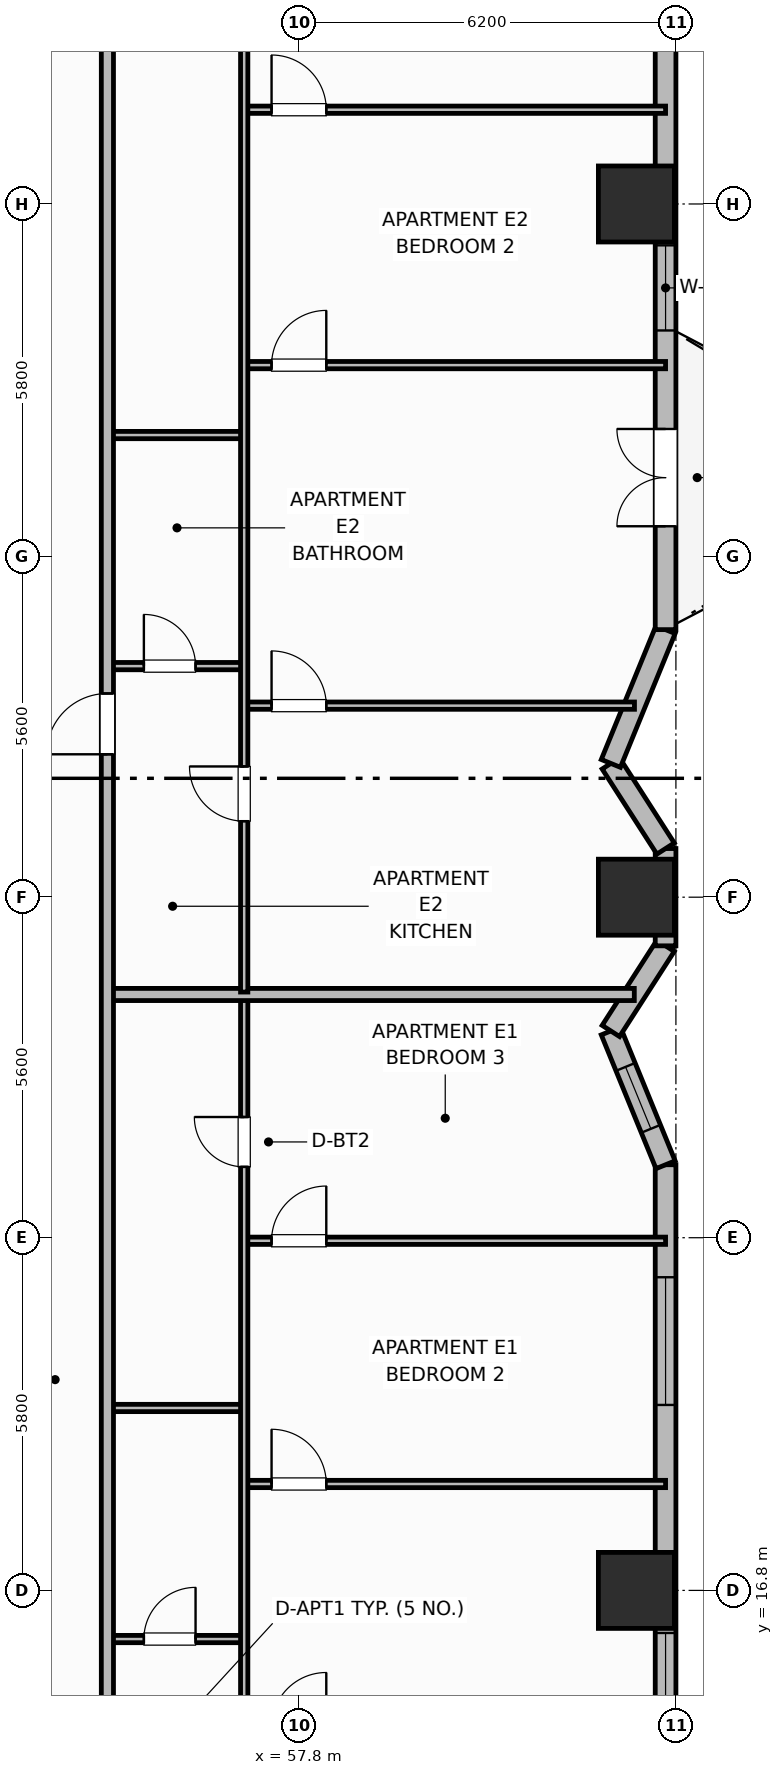
"""IFC4 building model, lengths in metres.
Left out: names, types, materials, properties, quantities, classifications, styles, units other than length and angle.
Written with IfcOpenShell. Run it as: python <this file> out.ifc"""

import sys

from ifc_helpers import new_model, si_unit, direction, frame, frame_2d, origin, origin_2d, place, context, subcontext, project, spatial, rectangle, extrude, element, fill, save


model = new_model("IFC4")
c1 = context("Model", 3, precision=1e-05, world=origin(), true_north=direction((0.0, 1.0)))
c2 = subcontext(c1, "Body", "Model", "MODEL_VIEW")
j1 = project(units=[si_unit("LENGTHUNIT", "METRE"), si_unit("PLANEANGLEUNIT", "RADIAN")], contexts=[c1])
p1 = place(None, origin())
s1 = spatial("IfcSite", under=j1, at=p1, CompositionType="ELEMENT")
p2 = place(p1, origin())
s2 = spatial("IfcBuilding", under=s1, at=p2, CompositionType="ELEMENT")
p3 = place(p2, frame((0.0, 0.0, 36.2)))
s3 = spatial("IfcBuildingStorey", under=s2, at=p3, CompositionType="ELEMENT", Elevation=36.2)
for number, where, z_axis, x_axis in (
    (1, (63.35, 16.8, 0.0), (0.0, 0.0, 1.0), (1.0, 0.0, 0.0)),
    (2, (63.35, 28.2, 0.0), (0.0, 0.0, 1.0), (1.0, 0.0, 0.0)),
    (3, (63.35, 39.6, 0.0), (0.0, 0.0, 1.0), (1.0, 0.0, 0.0)),
):
    element("IfcColumn", number, at=place(p3, frame(where, z_axis=z_axis, x_axis=x_axis)), inside=s3, PredefinedType="COLUMN", context=c2, shape_type="SweptSolid", body=[
        extrude(rectangle(XDim=1.25, YDim=1.25, at=origin_2d()), origin(), (0.0, 0.0, 1.0), 3.7),
    ])
p4 = place(p3, frame((63.83, 9.0, 0.0), z_axis=(0.0, 0.0, 1.0), x_axis=(0.0, 1.0, 0.0)))
e4 = element("IfcWall", 4, at=p4, inside=s3, PredefinedType="SOLIDWALL", context=c2, shape_type="SweptSolid", body=[
    extrude(rectangle(XDim=14.8, YDim=0.34, at=frame_2d((7.4, 0.0))), origin(), (0.0, 0.0, 1.0), 2.7),
])
p5 = place(p4, frame((2.9, 0.0, 0.68)))
e5 = element("IfcOpeningElement", 5, at=p5, cuts=e4, PredefinedType="OPENING", context=c2, shape_type="SweptSolid", body=[
    extrude(rectangle(XDim=2.1, YDim=1.9, at=frame_2d((1.05, 0.95))), frame((0.0, 0.18, 0.0), z_axis=(0.0, -1.0, 0.0), x_axis=(1.0, 0.0, 0.0)), (0.0, 0.0, 1.0), 0.36),
])
p6 = place(p4, frame((6.0, 0.0, 0.89)))
e6 = element("IfcOpeningElement", 6, at=p6, cuts=e4, PredefinedType="OPENING", context=c2, shape_type="SweptSolid", body=[
    extrude(rectangle(XDim=1.1, YDim=1.65, at=frame_2d((0.55, 0.825))), frame((0.0, 0.18, 0.0), z_axis=(0.0, -1.0, 0.0), x_axis=(1.0, 0.0, 0.0)), (0.0, 0.0, 1.0), 0.36),
])
p7 = place(p4, frame((10.85, 0.0, 0.68)))
e7 = element("IfcOpeningElement", 7, at=p7, cuts=e4, PredefinedType="OPENING", context=c2, shape_type="SweptSolid", body=[
    extrude(rectangle(XDim=2.1, YDim=1.9, at=frame_2d((1.05, 0.95))), frame((0.0, 0.18, 0.0), z_axis=(0.0, -1.0, 0.0), x_axis=(1.0, 0.0, 0.0)), (0.0, 0.0, 1.0), 0.36),
])
p8 = place(p3, frame((63.83, 23.8, 0.0), z_axis=(0.0, 0.0, 1.0), x_axis=(-0.378692835005, 0.925522412865, 0.0)))
e8 = element("IfcWall", 8, at=p8, inside=s3, PredefinedType="SOLIDWALL", context=c2, shape_type="SweptSolid", body=[
    extrude(rectangle(XDim=2.377, YDim=0.34, at=frame_2d((1.188, 0.0))), origin(), (0.0, 0.0, 1.0), 2.7),
])
p9 = place(p8, frame((0.638, 0.0, 0.89)))
e9 = element("IfcOpeningElement", 9, at=p9, cuts=e8, PredefinedType="OPENING", context=c2, shape_type="SweptSolid", body=[
    extrude(rectangle(XDim=1.1, YDim=1.65, at=frame_2d((0.55, 0.825))), frame((0.0, 0.18, 0.0), z_axis=(0.0, -1.0, 0.0), x_axis=(1.0, 0.0, 0.0)), (0.0, 0.0, 1.0), 0.36),
])
p10 = place(p3, frame((62.93, 26.0, 0.0), z_axis=(0.0, 0.0, 1.0), x_axis=(0.540846555596, 0.841121277403, 0.0)))
e10 = element("IfcWall", 10, at=p10, inside=s3, PredefinedType="SOLIDWALL", context=c2, shape_type="SweptSolid", body=[
    extrude(rectangle(XDim=1.664, YDim=0.34, at=frame_2d((0.832, 0.0))), origin(), (0.0, 0.0, 1.0), 2.7),
])
p11 = place(p3, frame((63.83, 27.4, 0.0), z_axis=(0.0, 0.0, 1.0), x_axis=(0.0, 1.0, 0.0)))
e11 = element("IfcWall", 11, at=p11, inside=s3, PredefinedType="SOLIDWALL", context=c2, shape_type="SweptSolid", body=[
    extrude(rectangle(XDim=1.6, YDim=0.34, at=frame_2d((0.8, 0.0))), origin(), (0.0, 0.0, 1.0), 2.7),
])
p12 = place(p3, frame((63.83, 29.0, 0.0), z_axis=(0.0, 0.0, 1.0), x_axis=(-0.540846555596, 0.841121277403, 0.0)))
e12 = element("IfcWall", 12, at=p12, inside=s3, PredefinedType="SOLIDWALL", context=c2, shape_type="SweptSolid", body=[
    extrude(rectangle(XDim=1.664, YDim=0.34, at=frame_2d((0.832, 0.0))), origin(), (0.0, 0.0, 1.0), 2.7),
])
p13 = place(p3, frame((62.93, 30.4, 0.0), z_axis=(0.0, 0.0, 1.0), x_axis=(0.378656839344, 0.925537140269, 0.0)))
e13 = element("IfcWall", 13, at=p13, inside=s3, PredefinedType="SOLIDWALL", context=c2, shape_type="SweptSolid", body=[
    extrude(rectangle(XDim=2.377, YDim=0.34, at=frame_2d((1.188, 0.0))), origin(), (0.0, 0.0, 1.0), 2.7),
])
p14 = place(p3, frame((63.83, 32.6, 0.0), z_axis=(0.0, 0.0, 1.0), x_axis=(0.0, 1.0, 0.0)))
e14 = element("IfcWall", 14, at=p14, inside=s3, PredefinedType="SOLIDWALL", context=c2, shape_type="SweptSolid", body=[
    extrude(rectangle(XDim=14.8, YDim=0.34, at=frame_2d((7.4, 0.0))), origin(), (0.0, 0.0, 1.0), 2.7),
])
p15 = place(p14, frame((1.7, 0.0, 0.0)))
e15 = element("IfcOpeningElement", 15, at=p15, cuts=e14, PredefinedType="OPENING", context=c2, shape_type="SweptSolid", body=[
    extrude(rectangle(XDim=1.6, YDim=2.1, at=frame_2d((0.8, 1.05))), frame((0.0, 0.18, 0.0), z_axis=(0.0, -1.0, 0.0), x_axis=(1.0, 0.0, 0.0)), (0.0, 0.0, 1.0), 0.36),
])
p16 = place(p14, frame((4.92, 0.0, 0.69)))
e16 = element("IfcOpeningElement", 16, at=p16, cuts=e14, PredefinedType="OPENING", context=c2, shape_type="SweptSolid", body=[
    extrude(rectangle(XDim=1.4, YDim=1.85, at=frame_2d((0.7, 0.925))), frame((0.0, 0.18, 0.0), z_axis=(0.0, -1.0, 0.0), x_axis=(1.0, 0.0, 0.0)), (0.0, 0.0, 1.0), 0.36),
])
p17 = place(p14, frame((9.95, 0.0, 0.73)))
e17 = element("IfcOpeningElement", 17, at=p17, cuts=e14, PredefinedType="OPENING", context=c2, shape_type="SweptSolid", body=[
    extrude(rectangle(XDim=1.8, YDim=1.85, at=frame_2d((0.9, 0.925))), frame((0.0, 0.18, 0.0), z_axis=(0.0, -1.0, 0.0), x_axis=(1.0, 0.0, 0.0)), (0.0, 0.0, 1.0), 0.36),
])
p18 = place(p3, frame((54.65, 16.0, 0.0), z_axis=(0.0, 0.0, 1.0), x_axis=(1.0, 0.0, 0.0)))
e18 = element("IfcWall", 18, at=p18, inside=s3, PredefinedType="PARTITIONING", context=c2, shape_type="SweptSolid", body=[
    extrude(rectangle(XDim=2.25, YDim=0.12, at=frame_2d((1.125, 0.0))), origin(), (0.0, 0.0, 1.0), 2.53),
])
p19 = place(p18, frame((0.6, 0.0, 0.0)))
e19 = element("IfcOpeningElement", 19, at=p19, cuts=e18, PredefinedType="OPENING", context=c2, shape_type="SweptSolid", body=[
    extrude(rectangle(XDim=0.85, YDim=2.1, at=frame_2d((0.425, 1.05))), frame((0.0, 0.07, 0.0), z_axis=(0.0, -1.0, 0.0), x_axis=(1.0, 0.0, 0.0)), (0.0, 0.0, 1.0), 0.14),
])
p20 = place(p3, frame((54.65, 19.8, 0.0), z_axis=(0.0, 0.0, 1.0), x_axis=(1.0, 0.0, 0.0)))
e20 = element("IfcWall", 20, at=p20, inside=s3, PredefinedType="PARTITIONING", context=c2, shape_type="SweptSolid", body=[
    extrude(rectangle(XDim=2.25, YDim=0.12, at=frame_2d((1.125, 0.0))), origin(), (0.0, 0.0, 1.0), 2.53),
])
p21 = place(p3, frame((56.9, 18.55, 0.0), z_axis=(0.0, 0.0, 1.0), x_axis=(1.0, 0.0, 0.0)))
e21 = element("IfcWall", 21, at=p21, inside=s3, PredefinedType="PARTITIONING", context=c2, shape_type="SweptSolid", body=[
    extrude(rectangle(XDim=6.93, YDim=0.12, at=frame_2d((3.465, 0.0))), origin(), (0.0, 0.0, 1.0), 2.53),
])
p22 = place(p21, frame((0.45, 0.0, 0.0)))
e22 = element("IfcOpeningElement", 22, at=p22, cuts=e21, PredefinedType="OPENING", context=c2, shape_type="SweptSolid", body=[
    extrude(rectangle(XDim=0.9, YDim=2.1, at=frame_2d((0.45, 1.05))), frame((0.0, 0.07, 0.0), z_axis=(0.0, -1.0, 0.0), x_axis=(1.0, 0.0, 0.0)), (0.0, 0.0, 1.0), 0.14),
])
p23 = place(p3, frame((56.9, 22.55, 0.0), z_axis=(0.0, 0.0, 1.0), x_axis=(1.0, 0.0, 0.0)))
e23 = element("IfcWall", 23, at=p23, inside=s3, PredefinedType="PARTITIONING", context=c2, shape_type="SweptSolid", body=[
    extrude(rectangle(XDim=6.93, YDim=0.12, at=frame_2d((3.465, 0.0))), origin(), (0.0, 0.0, 1.0), 2.53),
])
p24 = place(p23, frame((0.45, 0.0, 0.0)))
e24 = element("IfcOpeningElement", 24, at=p24, cuts=e23, PredefinedType="OPENING", context=c2, shape_type="SweptSolid", body=[
    extrude(rectangle(XDim=0.9, YDim=2.1, at=frame_2d((0.45, 1.05))), frame((0.0, 0.07, 0.0), z_axis=(0.0, -1.0, 0.0), x_axis=(1.0, 0.0, 0.0)), (0.0, 0.0, 1.0), 0.14),
])
p25 = place(p3, frame((56.9, 10.64, 0.0), z_axis=(0.0, 0.0, 1.0), x_axis=(0.0, 1.0, 0.0)))
e25 = element("IfcWall", 25, at=p25, inside=s3, PredefinedType="PARTITIONING", context=c2, shape_type="SweptSolid", body=[
    extrude(rectangle(XDim=15.92, YDim=0.12, at=frame_2d((7.96, 0.0))), origin(), (0.0, 0.0, 1.0), 2.53),
])
p26 = place(p25, frame((0.41, 0.0, 0.0)))
e26 = element("IfcOpeningElement", 26, at=p26, cuts=e25, PredefinedType="OPENING", context=c2, shape_type="SweptSolid", body=[
    extrude(rectangle(XDim=0.9, YDim=2.1, at=frame_2d((0.45, 1.05))), frame((0.0, 0.07, 0.0), z_axis=(0.0, -1.0, 0.0), x_axis=(1.0, 0.0, 0.0)), (0.0, 0.0, 1.0), 0.14),
])
p27 = place(p25, frame((13.125, 0.0, 0.0)))
e27 = element("IfcOpeningElement", 27, at=p27, cuts=e25, PredefinedType="OPENING", context=c2, shape_type="SweptSolid", body=[
    extrude(rectangle(XDim=0.82, YDim=2.08, at=frame_2d((0.41, 1.04))), frame((0.0, 0.07, 0.0), z_axis=(0.0, -1.0, 0.0), x_axis=(1.0, 0.0, 0.0)), (0.0, 0.0, 1.0), 0.14),
])
p28 = place(p3, frame((54.65, 26.6, 0.0), z_axis=(0.0, 0.0, 1.0), x_axis=(1.0, 0.0, 0.0)))
e28 = element("IfcWall", 28, at=p28, inside=s3, PredefinedType="PARTITIONING", context=c2, shape_type="SweptSolid", body=[
    extrude(rectangle(XDim=8.666, YDim=0.2, at=frame_2d((4.333, 0.0))), origin(), (0.0, 0.0, 1.0), 2.53),
])
p29 = place(p3, frame((54.65, 32.0, 0.0), z_axis=(0.0, 0.0, 1.0), x_axis=(1.0, 0.0, 0.0)))
e29 = element("IfcWall", 29, at=p29, inside=s3, PredefinedType="PARTITIONING", context=c2, shape_type="SweptSolid", body=[
    extrude(rectangle(XDim=2.25, YDim=0.12, at=frame_2d((1.125, 0.0))), origin(), (0.0, 0.0, 1.0), 2.53),
])
p30 = place(p29, frame((0.6, 0.0, 0.0)))
e30 = element("IfcOpeningElement", 30, at=p30, cuts=e29, PredefinedType="OPENING", context=c2, shape_type="SweptSolid", body=[
    extrude(rectangle(XDim=0.85, YDim=2.1, at=frame_2d((0.425, 1.05))), frame((0.0, 0.07, 0.0), z_axis=(0.0, -1.0, 0.0), x_axis=(1.0, 0.0, 0.0)), (0.0, 0.0, 1.0), 0.14),
])
p31 = place(p3, frame((54.65, 35.8, 0.0), z_axis=(0.0, 0.0, 1.0), x_axis=(1.0, 0.0, 0.0)))
e31 = element("IfcWall", 31, at=p31, inside=s3, PredefinedType="PARTITIONING", context=c2, shape_type="SweptSolid", body=[
    extrude(rectangle(XDim=2.25, YDim=0.12, at=frame_2d((1.125, 0.0))), origin(), (0.0, 0.0, 1.0), 2.53),
])
p32 = place(p3, frame((56.9, 31.35, 0.0), z_axis=(0.0, 0.0, 1.0), x_axis=(1.0, 0.0, 0.0)))
e32 = element("IfcWall", 32, at=p32, inside=s3, PredefinedType="PARTITIONING", context=c2, shape_type="SweptSolid", body=[
    extrude(rectangle(XDim=6.419, YDim=0.12, at=frame_2d((3.209, 0.0))), origin(), (0.0, 0.0, 1.0), 2.53),
])
p33 = place(p32, frame((0.45, 0.0, 0.0)))
e33 = element("IfcOpeningElement", 33, at=p33, cuts=e32, PredefinedType="OPENING", context=c2, shape_type="SweptSolid", body=[
    extrude(rectangle(XDim=0.9, YDim=2.1, at=frame_2d((0.45, 1.05))), frame((0.0, 0.07, 0.0), z_axis=(0.0, -1.0, 0.0), x_axis=(1.0, 0.0, 0.0)), (0.0, 0.0, 1.0), 0.14),
])
p34 = place(p3, frame((56.9, 36.95, 0.0), z_axis=(0.0, 0.0, 1.0), x_axis=(1.0, 0.0, 0.0)))
e34 = element("IfcWall", 34, at=p34, inside=s3, PredefinedType="PARTITIONING", context=c2, shape_type="SweptSolid", body=[
    extrude(rectangle(XDim=6.93, YDim=0.12, at=frame_2d((3.465, 0.0))), origin(), (0.0, 0.0, 1.0), 2.53),
])
p35 = place(p34, frame((0.45, 0.0, 0.0)))
e35 = element("IfcOpeningElement", 35, at=p35, cuts=e34, PredefinedType="OPENING", context=c2, shape_type="SweptSolid", body=[
    extrude(rectangle(XDim=0.9, YDim=2.1, at=frame_2d((0.45, 1.05))), frame((0.0, 0.07, 0.0), z_axis=(0.0, -1.0, 0.0), x_axis=(1.0, 0.0, 0.0)), (0.0, 0.0, 1.0), 0.14),
])
p36 = place(p3, frame((56.9, 41.15, 0.0), z_axis=(0.0, 0.0, 1.0), x_axis=(1.0, 0.0, 0.0)))
e36 = element("IfcWall", 36, at=p36, inside=s3, PredefinedType="PARTITIONING", context=c2, shape_type="SweptSolid", body=[
    extrude(rectangle(XDim=6.93, YDim=0.12, at=frame_2d((3.465, 0.0))), origin(), (0.0, 0.0, 1.0), 2.53),
])
p37 = place(p36, frame((0.45, 0.0, 0.0)))
e37 = element("IfcOpeningElement", 37, at=p37, cuts=e36, PredefinedType="OPENING", context=c2, shape_type="SweptSolid", body=[
    extrude(rectangle(XDim=0.9, YDim=2.1, at=frame_2d((0.45, 1.05))), frame((0.0, 0.07, 0.0), z_axis=(0.0, -1.0, 0.0), x_axis=(1.0, 0.0, 0.0)), (0.0, 0.0, 1.0), 0.14),
])
p38 = place(p3, frame((56.9, 26.64, 0.0), z_axis=(0.0, 0.0, 1.0), x_axis=(0.0, 1.0, 0.0)))
e38 = element("IfcWall", 38, at=p38, inside=s3, PredefinedType="PARTITIONING", context=c2, shape_type="SweptSolid", body=[
    extrude(rectangle(XDim=19.12, YDim=0.12, at=frame_2d((9.56, 0.0))), origin(), (0.0, 0.0, 1.0), 2.53),
])
p39 = place(p38, frame((2.81, 0.0, 0.0)))
e39 = element("IfcOpeningElement", 39, at=p39, cuts=e38, PredefinedType="OPENING", context=c2, shape_type="SweptSolid", body=[
    extrude(rectangle(XDim=0.9, YDim=2.1, at=frame_2d((0.45, 1.05))), frame((0.0, 0.07, 0.0), z_axis=(0.0, -1.0, 0.0), x_axis=(1.0, 0.0, 0.0)), (0.0, 0.0, 1.0), 0.14),
])
p40 = place(p38, frame((16.18, 0.0, 0.0)))
e40 = element("IfcOpeningElement", 40, at=p40, cuts=e38, PredefinedType="OPENING", context=c2, shape_type="SweptSolid", body=[
    extrude(rectangle(XDim=0.82, YDim=2.08, at=frame_2d((0.41, 1.04))), frame((0.0, 0.07, 0.0), z_axis=(0.0, -1.0, 0.0), x_axis=(1.0, 0.0, 0.0)), (0.0, 0.0, 1.0), 0.14),
])
p41 = place(p3, frame((54.65, 10.6, 0.0), z_axis=(0.0, 0.0, 1.0), x_axis=(0.0, 1.0, 0.0)))
e41 = element("IfcWall", 41, at=p41, inside=s3, PredefinedType="PARTITIONING", context=c2, shape_type="SweptSolid", body=[
    extrude(rectangle(XDim=35.2, YDim=0.2, at=frame_2d((17.6, 0.0))), origin(), (0.0, 0.0, 1.0), 2.53),
])
p42 = place(p41, frame((2.65, 0.0, 0.0)))
e42 = element("IfcOpeningElement", 42, at=p42, cuts=e41, PredefinedType="OPENING", context=c2, shape_type="SweptSolid", body=[
    extrude(rectangle(XDim=1.0, YDim=2.15, at=frame_2d((0.5, 1.075))), frame((0.0, 0.11, 0.0), z_axis=(0.0, -1.0, 0.0), x_axis=(1.0, 0.0, 0.0)), (0.0, 0.0, 1.0), 0.22),
])
p43 = place(p41, frame((19.95, 0.0, 0.0)))
e43 = element("IfcOpeningElement", 43, at=p43, cuts=e41, PredefinedType="OPENING", context=c2, shape_type="SweptSolid", body=[
    extrude(rectangle(XDim=1.0, YDim=2.15, at=frame_2d((0.5, 1.075))), frame((0.0, 0.11, 0.0), z_axis=(0.0, -1.0, 0.0), x_axis=(1.0, 0.0, 0.0)), (0.0, 0.0, 1.0), 0.22),
])
p44 = place(p6, origin())
e44 = element("IfcWindow", 44, at=p44, inside=s3, PartitioningType="SINGLE_PANEL", PredefinedType="WINDOW", context=c2, shape_type="SweptSolid", body=[
    extrude(rectangle(XDim=1.1, YDim=1.65, at=frame_2d((0.55, 0.825))), frame((0.0, 0.03, 0.0), z_axis=(0.0, -1.0, 0.0), x_axis=(1.0, 0.0, 0.0)), (0.0, 0.0, 1.0), 0.06),
])
fill(e6, e44)
p45 = place(p7, origin())
e45 = element("IfcWindow", 45, at=p45, inside=s3, PartitioningType="SINGLE_PANEL", PredefinedType="WINDOW", context=c2, shape_type="SweptSolid", body=[
    extrude(rectangle(XDim=2.1, YDim=1.9, at=frame_2d((1.05, 0.95))), frame((0.0, 0.03, 0.0), z_axis=(0.0, -1.0, 0.0), x_axis=(1.0, 0.0, 0.0)), (0.0, 0.0, 1.0), 0.06),
])
fill(e7, e45)
p46 = place(p9, origin())
e46 = element("IfcWindow", 46, at=p46, inside=s3, PartitioningType="SINGLE_PANEL", PredefinedType="WINDOW", context=c2, shape_type="SweptSolid", body=[
    extrude(rectangle(XDim=1.1, YDim=1.65, at=frame_2d((0.55, 0.825))), frame((0.0, 0.03, 0.0), z_axis=(0.0, -1.0, 0.0), x_axis=(1.0, 0.0, 0.0)), (0.0, 0.0, 1.0), 0.06),
])
fill(e9, e46)
p47 = place(p15, origin())
e47 = element("IfcDoor", 47, at=p47, inside=s3, OperationType="DOUBLE_DOOR_SINGLE_SWING", PredefinedType="DOOR", context=c2, shape_type="SweptSolid", body=[
    extrude(rectangle(XDim=1.6, YDim=2.1, at=frame_2d((0.8, 1.05))), frame((0.0, 0.025, 0.0), z_axis=(0.0, -1.0, 0.0), x_axis=(1.0, 0.0, 0.0)), (0.0, 0.0, 1.0), 0.05),
])
fill(e15, e47)
p48 = place(p16, origin())
e48 = element("IfcWindow", 48, at=p48, inside=s3, PartitioningType="SINGLE_PANEL", PredefinedType="WINDOW", context=c2, shape_type="SweptSolid", body=[
    extrude(rectangle(XDim=1.4, YDim=1.85, at=frame_2d((0.7, 0.925))), frame((0.0, 0.03, 0.0), z_axis=(0.0, -1.0, 0.0), x_axis=(1.0, 0.0, 0.0)), (0.0, 0.0, 1.0), 0.06),
])
fill(e16, e48)
p49 = place(p19, origin())
e49 = element("IfcDoor", 49, at=p49, inside=s3, OperationType="SINGLE_SWING_RIGHT", PredefinedType="DOOR", context=c2, shape_type="SweptSolid", body=[
    extrude(rectangle(XDim=0.85, YDim=2.1, at=frame_2d((0.425, 1.05))), frame((0.0, 0.025, 0.0), z_axis=(0.0, -1.0, 0.0), x_axis=(1.0, 0.0, 0.0)), (0.0, 0.0, 1.0), 0.05),
])
fill(e19, e49)
p50 = place(p22, origin())
e50 = element("IfcDoor", 50, at=p50, inside=s3, OperationType="SINGLE_SWING_LEFT", PredefinedType="DOOR", context=c2, shape_type="SweptSolid", body=[
    extrude(rectangle(XDim=0.9, YDim=2.1, at=frame_2d((0.45, 1.05))), frame((0.0, 0.025, 0.0), z_axis=(0.0, -1.0, 0.0), x_axis=(1.0, 0.0, 0.0)), (0.0, 0.0, 1.0), 0.05),
])
fill(e22, e50)
p51 = place(p24, origin())
e51 = element("IfcDoor", 51, at=p51, inside=s3, OperationType="SINGLE_SWING_RIGHT", PredefinedType="DOOR", context=c2, shape_type="SweptSolid", body=[
    extrude(rectangle(XDim=0.9, YDim=2.1, at=frame_2d((0.45, 1.05))), frame((0.0, 0.025, 0.0), z_axis=(0.0, -1.0, 0.0), x_axis=(1.0, 0.0, 0.0)), (0.0, 0.0, 1.0), 0.05),
])
fill(e24, e51)
p52 = place(p27, origin())
e52 = element("IfcDoor", 52, at=p52, inside=s3, OperationType="SINGLE_SWING_RIGHT", PredefinedType="DOOR", context=c2, shape_type="SweptSolid", body=[
    extrude(rectangle(XDim=0.82, YDim=2.08, at=frame_2d((0.41, 1.04))), frame((0.0, 0.025, 0.0), z_axis=(0.0, -1.0, 0.0), x_axis=(1.0, 0.0, 0.0)), (0.0, 0.0, 1.0), 0.05),
])
fill(e27, e52)
p53 = place(p30, origin())
e53 = element("IfcDoor", 53, at=p53, inside=s3, OperationType="SINGLE_SWING_LEFT", PredefinedType="DOOR", context=c2, shape_type="SweptSolid", body=[
    extrude(rectangle(XDim=0.85, YDim=2.1, at=frame_2d((0.425, 1.05))), frame((0.0, 0.025, 0.0), z_axis=(0.0, -1.0, 0.0), x_axis=(1.0, 0.0, 0.0)), (0.0, 0.0, 1.0), 0.05),
])
fill(e30, e53)
p54 = place(p33, origin())
e54 = element("IfcDoor", 54, at=p54, inside=s3, OperationType="SINGLE_SWING_LEFT", PredefinedType="DOOR", context=c2, shape_type="SweptSolid", body=[
    extrude(rectangle(XDim=0.9, YDim=2.1, at=frame_2d((0.45, 1.05))), frame((0.0, 0.025, 0.0), z_axis=(0.0, -1.0, 0.0), x_axis=(1.0, 0.0, 0.0)), (0.0, 0.0, 1.0), 0.05),
])
fill(e33, e54)
p55 = place(p35, origin())
e55 = element("IfcDoor", 55, at=p55, inside=s3, OperationType="SINGLE_SWING_RIGHT", PredefinedType="DOOR", context=c2, shape_type="SweptSolid", body=[
    extrude(rectangle(XDim=0.9, YDim=2.1, at=frame_2d((0.45, 1.05))), frame((0.0, 0.025, 0.0), z_axis=(0.0, -1.0, 0.0), x_axis=(1.0, 0.0, 0.0)), (0.0, 0.0, 1.0), 0.05),
])
fill(e35, e55)
p56 = place(p37, origin())
e56 = element("IfcDoor", 56, at=p56, inside=s3, OperationType="SINGLE_SWING_LEFT", PredefinedType="DOOR", context=c2, shape_type="SweptSolid", body=[
    extrude(rectangle(XDim=0.9, YDim=2.1, at=frame_2d((0.45, 1.05))), frame((0.0, 0.025, 0.0), z_axis=(0.0, -1.0, 0.0), x_axis=(1.0, 0.0, 0.0)), (0.0, 0.0, 1.0), 0.05),
])
fill(e37, e56)
p57 = place(p39, origin())
e57 = element("IfcDoor", 57, at=p57, inside=s3, OperationType="SINGLE_SWING_RIGHT", PredefinedType="DOOR", context=c2, shape_type="SweptSolid", body=[
    extrude(rectangle(XDim=0.9, YDim=2.1, at=frame_2d((0.45, 1.05))), frame((0.0, 0.025, 0.0), z_axis=(0.0, -1.0, 0.0), x_axis=(1.0, 0.0, 0.0)), (0.0, 0.0, 1.0), 0.05),
])
fill(e39, e57)
p58 = place(p43, origin())
e58 = element("IfcDoor", 58, at=p58, inside=s3, OperationType="SINGLE_SWING_LEFT", PredefinedType="DOOR", context=c2, shape_type="SweptSolid", body=[
    extrude(rectangle(XDim=1.0, YDim=2.15, at=frame_2d((0.5, 1.075))), frame((0.0, 0.025, 0.0), z_axis=(0.0, -1.0, 0.0), x_axis=(1.0, 0.0, 0.0)), (0.0, 0.0, 1.0), 0.05),
])
fill(e43, e58)
save(model, sys.argv[1])
